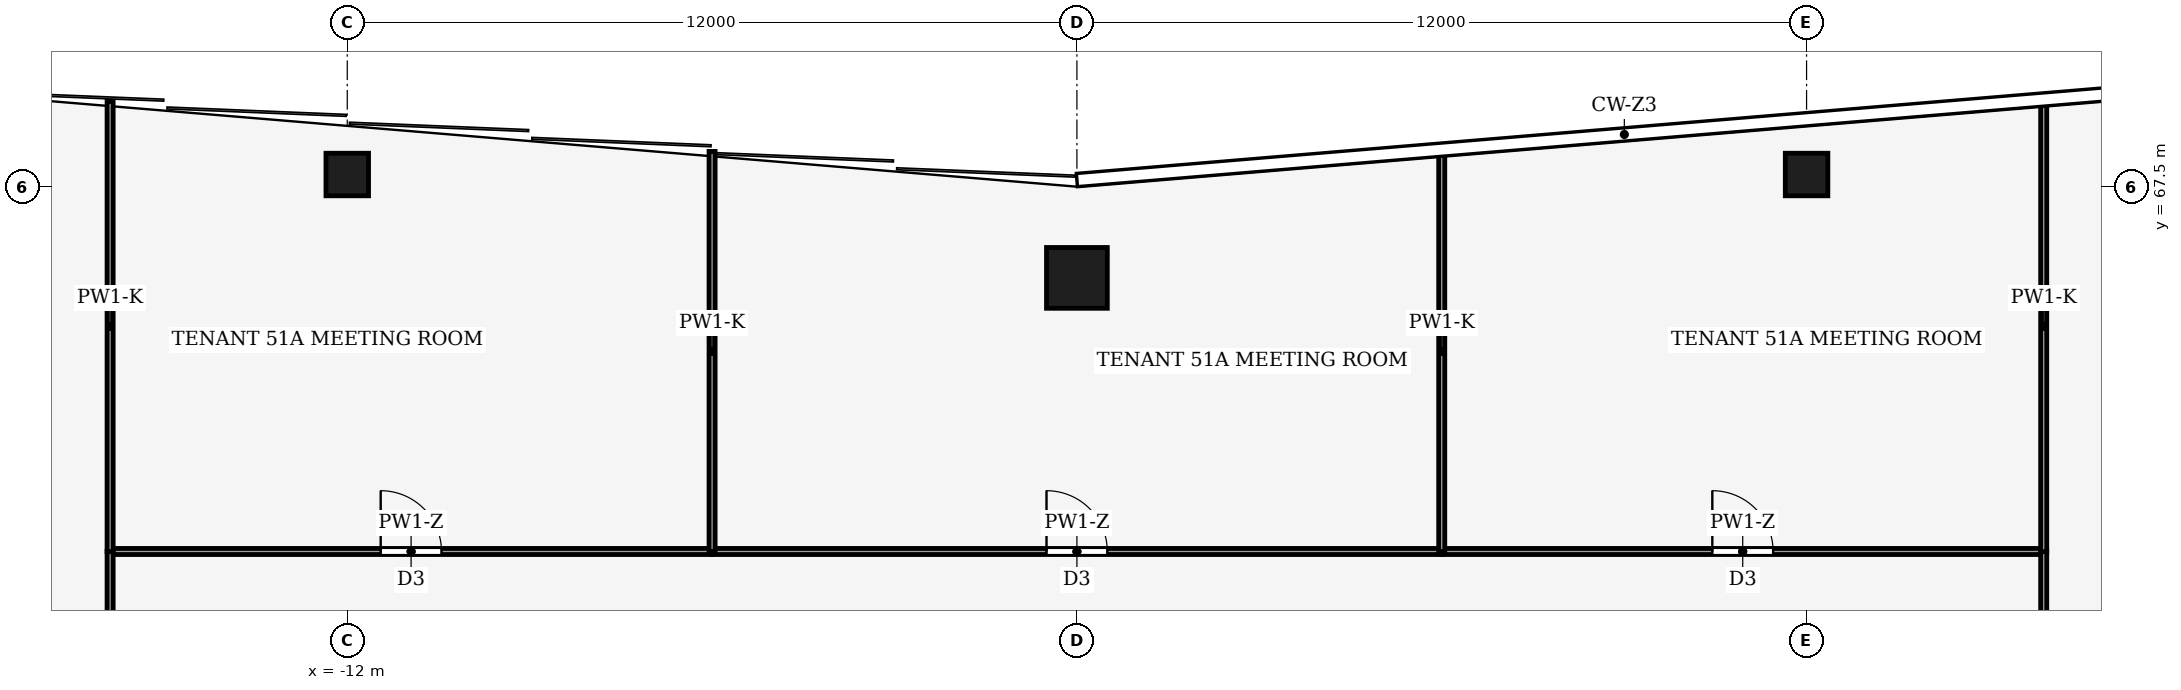
"""IFC4 building model, lengths in metres.
Left out: names, types, materials, properties, quantities, classifications, styles, units other than length and angle.
Written with IfcOpenShell. Run it as: python <this file> out.ifc"""

import sys

from ifc_helpers import new_model, si_unit, direction, frame, frame_2d, origin, origin_2d, place, context, subcontext, project, spatial, rectangle, hollow_rectangle, extrude, element, fill, save


model = new_model("IFC4")
c1 = context("Model", 3, precision=1e-05, world=origin(), true_north=direction((0.0, 1.0)))
c2 = subcontext(c1, "Body", "Model", "MODEL_VIEW")
j1 = project(units=[si_unit("LENGTHUNIT", "METRE"), si_unit("PLANEANGLEUNIT", "RADIAN")], contexts=[c1])
p1 = place(None, origin())
s1 = spatial("IfcSite", under=j1, at=p1, CompositionType="ELEMENT")
p2 = place(p1, origin())
s2 = spatial("IfcBuilding", under=s1, at=p2, CompositionType="ELEMENT")
p3 = place(p2, frame((0.0, 0.0, 222.0)))
s3 = spatial("IfcBuildingStorey", under=s2, at=p3, CompositionType="ELEMENT", Elevation=222.0)
p4 = place(p3, frame((0.0, 66.0, 0.0), z_axis=(0.0, 0.0, 1.0), x_axis=(1.0, 0.0, 0.0)))
e1 = element("IfcColumn", 1, at=p4, inside=s3, PredefinedType="COLUMN", context=c2, shape_type="SweptSolid", body=[
    extrude(hollow_rectangle(XDim=1.0, YDim=1.0, WallThickness=0.06, at=origin_2d()), origin(), (0.0, 0.0, 1.0), 4.0),
])
for number, where, z_axis, x_axis in (
    (2, (-12.0, 67.7, 0.0), (0.0, 0.0, 1.0), (1.0, 0.0, 0.0)),
    (3, (12.0, 67.7, 0.0), (0.0, 0.0, 1.0), (1.0, 0.0, 0.0)),
):
    element("IfcColumn", number, at=place(p3, frame(where, z_axis=z_axis, x_axis=x_axis)), inside=s3, PredefinedType="COLUMN", context=c2, shape_type="SweptSolid", body=[
        extrude(hollow_rectangle(XDim=0.7, YDim=0.7, WallThickness=0.03, at=origin_2d()), origin(), (0.0, 0.0, 1.0), 4.0),
    ])
p5 = place(p3, frame((-15.9, 61.5, 0.0), z_axis=(0.0, 0.0, 1.0), x_axis=(1.0, 0.0, 0.0)))
e4 = element("IfcWall", 4, at=p5, inside=s3, PredefinedType="PARTITIONING", context=c2, shape_type="SweptSolid", body=[
    extrude(rectangle(XDim=9.9, YDim=0.1, at=frame_2d((4.95, 0.0))), origin(), (0.0, 0.0, 1.0), 3.12),
])
p6 = place(p5, frame((4.45, 0.0, 0.0)))
e5 = element("IfcOpeningElement", 5, at=p6, cuts=e4, PredefinedType="OPENING", context=c2, shape_type="SweptSolid", body=[
    extrude(rectangle(XDim=1.0, YDim=2.1, at=frame_2d((0.5, 1.05))), frame((0.0, 0.06, 0.0), z_axis=(0.0, -1.0, 0.0), x_axis=(1.0, 0.0, 0.0)), (0.0, 0.0, 1.0), 0.12),
])
p7 = place(p3, frame((-6.0, 61.5, 0.0), z_axis=(0.0, 0.0, 1.0), x_axis=(1.0, 0.0, 0.0)))
e6 = element("IfcWall", 6, at=p7, inside=s3, PredefinedType="PARTITIONING", context=c2, shape_type="SweptSolid", body=[
    extrude(rectangle(XDim=12.0, YDim=0.1, at=frame_2d((6.0, 0.0))), origin(), (0.0, 0.0, 1.0), 3.12),
])
p8 = place(p7, frame((5.5, 0.0, 0.0)))
e7 = element("IfcOpeningElement", 7, at=p8, cuts=e6, PredefinedType="OPENING", context=c2, shape_type="SweptSolid", body=[
    extrude(rectangle(XDim=1.0, YDim=2.1, at=frame_2d((0.5, 1.05))), frame((0.0, 0.06, 0.0), z_axis=(0.0, -1.0, 0.0), x_axis=(1.0, 0.0, 0.0)), (0.0, 0.0, 1.0), 0.12),
])
p9 = place(p3, frame((6.0, 61.5, 0.0), z_axis=(0.0, 0.0, 1.0), x_axis=(1.0, 0.0, 0.0)))
e8 = element("IfcWall", 8, at=p9, inside=s3, PredefinedType="PARTITIONING", context=c2, shape_type="SweptSolid", body=[
    extrude(rectangle(XDim=9.9, YDim=0.1, at=frame_2d((4.95, 0.0))), origin(), (0.0, 0.0, 1.0), 3.12),
])
p10 = place(p9, frame((4.45, 0.0, 0.0)))
e9 = element("IfcOpeningElement", 9, at=p10, cuts=e8, PredefinedType="OPENING", context=c2, shape_type="SweptSolid", body=[
    extrude(rectangle(XDim=1.0, YDim=2.1, at=frame_2d((0.5, 1.05))), frame((0.0, 0.06, 0.0), z_axis=(0.0, -1.0, 0.0), x_axis=(1.0, 0.0, 0.0)), (0.0, 0.0, 1.0), 0.12),
])
for number, where, z_axis, x_axis in (
    (10, (-15.9, 61.504, 0.0), (0.0, 0.0, 1.0), (0.0, -1.0, 0.0)),
    (11, (15.9, 46.496, 0.0), (0.0, 0.0, 1.0), (0.0, 1.0, 0.0)),
):
    element("IfcWall", number, at=place(p3, frame(where, z_axis=z_axis, x_axis=x_axis)), inside=s3, PredefinedType="PARTITIONING", context=c2, shape_type="SweptSolid", body=[
        extrude(rectangle(XDim=15.008, YDim=0.1, at=frame_2d((7.504, 0.0))), origin(), (0.0, 0.0, 1.0), 3.12),
    ])
p11 = place(p3, frame((-6.0, 61.5, 0.0), z_axis=(0.0, 0.0, 1.0), x_axis=(0.0, 1.0, 0.0)))
e12 = element("IfcWall", 12, at=p11, inside=s3, PredefinedType="PARTITIONING", context=c2, shape_type="SweptSolid", body=[
    extrude(rectangle(XDim=6.58, YDim=0.1, at=frame_2d((3.29, 0.0))), origin(), (0.0, 0.0, 1.0), 2.92),
])
p12 = place(p3, frame((-15.9, 68.905, 0.0), z_axis=(0.0, 0.0, 1.0), x_axis=(0.0, -1.0, 0.0)))
e13 = element("IfcWall", 13, at=p12, inside=s3, PredefinedType="PARTITIONING", context=c2, shape_type="SweptSolid", body=[
    extrude(rectangle(XDim=7.409, YDim=0.1, at=frame_2d((3.705, 0.0))), origin(), (0.0, 0.0, 1.0), 2.92),
])
p13 = place(p3, frame((6.0, 61.5, 0.0), z_axis=(0.0, 0.0, 1.0), x_axis=(0.0, 1.0, 0.0)))
e14 = element("IfcWall", 14, at=p13, inside=s3, PredefinedType="PARTITIONING", context=c2, shape_type="SweptSolid", body=[
    extrude(rectangle(XDim=6.58, YDim=0.1, at=frame_2d((3.29, 0.0))), origin(), (0.0, 0.0, 1.0), 2.92),
])
p14 = place(p3, frame((15.9, 61.496, 0.0), z_axis=(0.0, 0.0, 1.0), x_axis=(0.0, 1.0, 0.0)))
e15 = element("IfcWall", 15, at=p14, inside=s3, PredefinedType="PARTITIONING", context=c2, shape_type="SweptSolid", body=[
    extrude(rectangle(XDim=7.409, YDim=0.1, at=frame_2d((3.705, 0.0))), origin(), (0.0, 0.0, 1.0), 2.92),
])
p15 = place(p6, origin())
e16 = element("IfcDoor", 16, at=p15, inside=s3, OperationType="SINGLE_SWING_LEFT", PredefinedType="DOOR", context=c2, shape_type="SweptSolid", body=[
    extrude(rectangle(XDim=1.0, YDim=2.1, at=frame_2d((0.5, 1.05))), frame((0.0, 0.025, 0.0), z_axis=(0.0, -1.0, 0.0), x_axis=(1.0, 0.0, 0.0)), (0.0, 0.0, 1.0), 0.05),
])
fill(e5, e16)
p16 = place(p8, origin())
e17 = element("IfcDoor", 17, at=p16, inside=s3, OperationType="SINGLE_SWING_RIGHT", PredefinedType="DOOR", context=c2, shape_type="SweptSolid", body=[
    extrude(rectangle(XDim=1.0, YDim=2.1, at=frame_2d((0.5, 1.05))), frame((0.0, 0.025, 0.0), z_axis=(0.0, -1.0, 0.0), x_axis=(1.0, 0.0, 0.0)), (0.0, 0.0, 1.0), 0.05),
])
fill(e7, e17)
p17 = place(p10, origin())
e18 = element("IfcDoor", 18, at=p17, inside=s3, OperationType="SINGLE_SWING_LEFT", PredefinedType="DOOR", context=c2, shape_type="SweptSolid", body=[
    extrude(rectangle(XDim=1.0, YDim=2.1, at=frame_2d((0.5, 1.05))), frame((0.0, 0.025, 0.0), z_axis=(0.0, -1.0, 0.0), x_axis=(1.0, 0.0, 0.0)), (0.0, 0.0, 1.0), 0.05),
])
fill(e9, e18)
save(model, sys.argv[1])
